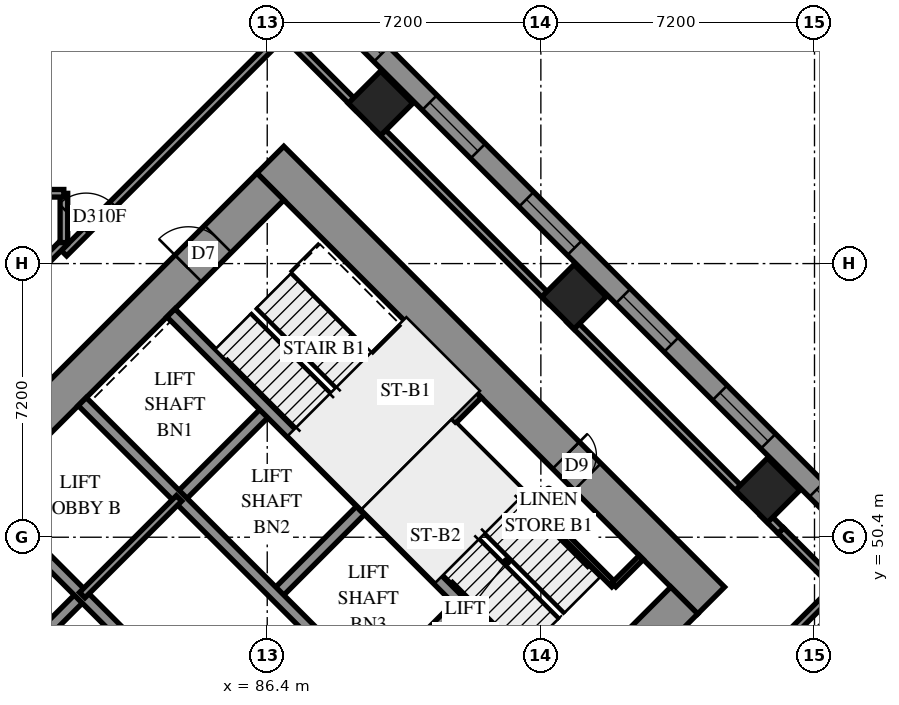
"""IFC4 building model, lengths in metres.
Left out: names, types, materials, properties, quantities, classifications, styles, units other than length and angle.
Written with IfcOpenShell. Run it as: python <this file> out.ifc"""

import sys

from ifc_helpers import new_model, si_unit, direction, frame, frame_2d, origin, origin_2d, place, context, subcontext, project, spatial, polyline, rectangle, outline, extrude, element, fill, save


model = new_model("IFC4")
c1 = context("Model", 3, precision=1e-05, world=origin(), true_north=direction((0.0, 1.0)))
c2 = subcontext(c1, "Body", "Model", "MODEL_VIEW")
j1 = project(units=[si_unit("LENGTHUNIT", "METRE"), si_unit("PLANEANGLEUNIT", "RADIAN")], contexts=[c1])
p1 = place(None, origin())
s1 = spatial("IfcSite", under=j1, at=p1, CompositionType="ELEMENT")
p2 = place(p1, origin())
s2 = spatial("IfcBuilding", under=s1, at=p2, CompositionType="ELEMENT")
p3 = place(p2, frame((0.0, 0.0, 10.2)))
s3 = spatial("IfcBuildingStorey", under=s2, at=p3, CompositionType="ELEMENT", Elevation=10.2)
for number, where, z_axis, x_axis in (
    (1, (89.382, 61.818, 0.0), (0.0, 0.0, 1.0), (0.707, -0.707, 0.0)),
    (2, (94.474, 56.727, 0.0), (0.0, 0.0, 1.0), (0.707, -0.707, 0.0)),
    (3, (99.565, 51.635, 0.0), (0.0, 0.0, 1.0), (0.707, -0.707, 0.0)),
):
    element("IfcColumn", number, at=place(p3, frame(where, z_axis=z_axis, x_axis=x_axis)), inside=s3, PredefinedType="COLUMN", context=c2, shape_type="SweptSolid", body=[
        extrude(rectangle(XDim=1.2, YDim=1.2, at=origin_2d()), origin(), (0.0, 0.0, 1.0), 3.8),
    ])
p4 = place(p3, frame((75.594, 49.443, -0.4), z_axis=(0.0, 0.0, 1.0), x_axis=(0.7071037324, -0.70710983, 0.0)))
e4 = element("IfcWall", 4, at=p4, inside=s3, PredefinedType="SHEAR", context=c2, shape_type="SweptSolid", body=[
    extrude(rectangle(XDim=16.4, YDim=1.0, at=frame_2d((8.2, 0.0))), origin(), (0.0, 0.0, 1.0), 3.5),
])
p5 = place(p3, frame((86.483, 60.333, -0.4), z_axis=(0.0, 0.0, 1.0), x_axis=(0.70710983, -0.7071037324, 0.0)))
e5 = element("IfcWall", 5, at=p5, inside=s3, PredefinedType="SHEAR", context=c2, shape_type="SweptSolid", body=[
    extrude(rectangle(XDim=16.4, YDim=1.0, at=frame_2d((8.2, 0.0))), origin(), (0.0, 0.0, 1.0), 3.5),
])
p6 = place(p5, frame((11.0, 0.0, 0.4)))
e6 = element("IfcOpeningElement", 6, at=p6, cuts=e5, PredefinedType="OPENING", context=c2, shape_type="SweptSolid", body=[
    extrude(rectangle(XDim=0.8, YDim=2.1, at=frame_2d((0.4, 1.05))), frame((0.0, 0.51, 0.0), z_axis=(0.0, -1.0, 0.0), x_axis=(1.0, 0.0, 0.0)), (0.0, 0.0, 1.0), 1.02),
])
p7 = place(p3, frame((76.301, 49.443, -0.4), z_axis=(0.0, 0.0, 1.0), x_axis=(0.7071067812, 0.7071067812, 0.0)))
e7 = element("IfcWall", 7, at=p7, inside=s3, PredefinedType="SHEAR", context=c2, shape_type="SweptSolid", body=[
    extrude(rectangle(XDim=14.4, YDim=1.0, at=frame_2d((7.2, 0.0))), origin(), (0.0, 0.0, 1.0), 3.5),
])
p8 = place(p7, frame((4.55, 0.0, 0.4)))
e8 = element("IfcOpeningElement", 8, at=p8, cuts=e7, PredefinedType="OPENING", context=c2, shape_type="SweptSolid", body=[
    extrude(rectangle(XDim=1.1, YDim=2.1, at=frame_2d((0.55, 1.05))), frame((0.0, 0.51, 0.0), z_axis=(0.0, -1.0, 0.0), x_axis=(1.0, 0.0, 0.0)), (0.0, 0.0, 1.0), 1.02),
])
p9 = place(p7, frame((11.35, 0.0, 0.4)))
e9 = element("IfcOpeningElement", 9, at=p9, cuts=e7, PredefinedType="OPENING", context=c2, shape_type="SweptSolid", body=[
    extrude(rectangle(XDim=1.1, YDim=2.1, at=frame_2d((0.55, 1.05))), frame((0.0, 0.51, 0.0), z_axis=(0.0, -1.0, 0.0), x_axis=(1.0, 0.0, 0.0)), (0.0, 0.0, 1.0), 1.02),
])
p10 = place(p3, frame((87.19, 38.554, -0.4), z_axis=(0.0, 0.0, 1.0), x_axis=(0.707103309, 0.7071102534, 0.0)))
e10 = element("IfcWall", 10, at=p10, inside=s3, PredefinedType="SHEAR", context=c2, shape_type="SweptSolid", body=[
    extrude(rectangle(XDim=14.4, YDim=1.0, at=frame_2d((7.2, 0.0))), origin(), (0.0, 0.0, 1.0), 3.5),
])
p11 = place(p10, frame((4.55, 0.0, 0.4)))
e11 = element("IfcOpeningElement", 11, at=p11, cuts=e10, PredefinedType="OPENING", context=c2, shape_type="SweptSolid", body=[
    extrude(rectangle(XDim=1.1, YDim=2.1, at=frame_2d((0.55, 1.05))), frame((0.0, 0.51, 0.0), z_axis=(0.0, -1.0, 0.0), x_axis=(1.0, 0.0, 0.0)), (0.0, 0.0, 1.0), 1.02),
])
p12 = place(p10, frame((11.35, 0.0, 0.4)))
e12 = element("IfcOpeningElement", 12, at=p12, cuts=e10, PredefinedType="OPENING", context=c2, shape_type="SweptSolid", body=[
    extrude(rectangle(XDim=1.1, YDim=2.1, at=frame_2d((0.55, 1.05))), frame((0.0, 0.51, 0.0), z_axis=(0.0, -1.0, 0.0), x_axis=(1.0, 0.0, 0.0)), (0.0, 0.0, 1.0), 1.02),
])
for number, where, z_axis, x_axis in (
    (13, (79.2, 46.544, 0.0), (0.0, 0.0, 1.0), (0.707, 0.707, 0.0)),
    (14, (84.079, 51.423, 0.0), (0.0, 0.0, 1.0), (0.707, 0.707, 0.0)),
):
    element("IfcWall", number, at=place(p3, frame(where, z_axis=z_axis, x_axis=x_axis)), inside=s3, PredefinedType="SOLIDWALL", context=c2, shape_type="SweptSolid", body=[
        extrude(rectangle(XDim=3.3, YDim=0.3, at=frame_2d((1.65, 0.0))), origin(), (0.0, 0.0, 1.0), 3.8),
    ])
for number, where, z_axis, x_axis in (
    (15, (86.625, 48.878, 0.0), (0.0, 0.0, 1.0), (0.707, 0.707, 0.0)),
    (16, (89.17, 46.332, 0.0), (0.0, 0.0, 1.0), (0.707, 0.707, 0.0)),
):
    element("IfcWall", number, at=place(p3, frame(where, z_axis=z_axis, x_axis=x_axis)), inside=s3, PredefinedType="SOLIDWALL", context=c2, shape_type="SweptSolid", body=[
        extrude(rectangle(XDim=3.3, YDim=0.3, at=frame_2d((1.65, 0.0))), origin(), (0.0, 0.0, 1.0), 3.8),
    ])
p13 = place(p3, frame((78.988, 51.423, 0.0), z_axis=(0.0, 0.0, 1.0), x_axis=(0.7071067812, -0.7071067812, 0.0)))
e17 = element("IfcWall", 17, at=p13, inside=s3, PredefinedType="SOLIDWALL", context=c2, shape_type="SweptSolid", body=[
    extrude(rectangle(XDim=14.4, YDim=0.3, at=frame_2d((7.2, 0.0))), origin(), (0.0, 0.0, 1.0), 3.8),
])
p14 = place(p13, frame((1.25, 0.0, 0.0)))
e18 = element("IfcOpeningElement", 18, at=p14, cuts=e17, PredefinedType="OPENING", context=c2, shape_type="SweptSolid", body=[
    extrude(rectangle(XDim=1.1, YDim=2.1, at=frame_2d((0.55, 1.05))), frame((0.0, 0.16, 0.0), z_axis=(0.0, -1.0, 0.0), x_axis=(1.0, 0.0, 0.0)), (0.0, 0.0, 1.0), 0.32),
])
p15 = place(p13, frame((4.85, 0.0, 0.0)))
e19 = element("IfcOpeningElement", 19, at=p15, cuts=e17, PredefinedType="OPENING", context=c2, shape_type="SweptSolid", body=[
    extrude(rectangle(XDim=1.1, YDim=2.1, at=frame_2d((0.55, 1.05))), frame((0.0, 0.16, 0.0), z_axis=(0.0, -1.0, 0.0), x_axis=(1.0, 0.0, 0.0)), (0.0, 0.0, 1.0), 0.32),
])
p16 = place(p13, frame((8.45, 0.0, 0.0)))
e20 = element("IfcOpeningElement", 20, at=p16, cuts=e17, PredefinedType="OPENING", context=c2, shape_type="SweptSolid", body=[
    extrude(rectangle(XDim=1.1, YDim=2.1, at=frame_2d((0.55, 1.05))), frame((0.0, 0.16, 0.0), z_axis=(0.0, -1.0, 0.0), x_axis=(1.0, 0.0, 0.0)), (0.0, 0.0, 1.0), 0.32),
])
p17 = place(p13, frame((12.05, 0.0, 0.0)))
e21 = element("IfcOpeningElement", 21, at=p17, cuts=e17, PredefinedType="OPENING", context=c2, shape_type="SweptSolid", body=[
    extrude(rectangle(XDim=1.1, YDim=2.1, at=frame_2d((0.55, 1.05))), frame((0.0, 0.16, 0.0), z_axis=(0.0, -1.0, 0.0), x_axis=(1.0, 0.0, 0.0)), (0.0, 0.0, 1.0), 0.32),
])
p18 = place(p3, frame((81.534, 53.969, 0.0), z_axis=(0.0, 0.0, 1.0), x_axis=(0.707103309, -0.7071102534, 0.0)))
e22 = element("IfcWall", 22, at=p18, inside=s3, PredefinedType="SOLIDWALL", context=c2, shape_type="SweptSolid", body=[
    extrude(rectangle(XDim=14.4, YDim=0.3, at=frame_2d((7.2, 0.0))), origin(), (0.0, 0.0, 1.0), 3.8),
])
p19 = place(p18, frame((12.05, 0.0, 0.0)))
e23 = element("IfcOpeningElement", 23, at=p19, cuts=e22, PredefinedType="OPENING", context=c2, shape_type="SweptSolid", body=[
    extrude(rectangle(XDim=1.1, YDim=2.1, at=frame_2d((0.55, 1.05))), frame((0.0, 0.16, 0.0), z_axis=(0.0, -1.0, 0.0), x_axis=(1.0, 0.0, 0.0)), (0.0, 0.0, 1.0), 0.32),
])
for number, where, z_axis, x_axis in (
    (24, (83.867, 56.302, 0.0), (0.0, 0.0, 1.0), (0.707, -0.707, 0.0)),
    (25, (88.958, 51.211, 0.0), (0.0, 0.0, 1.0), (0.707, -0.707, 0.0)),
):
    element("IfcWall", number, at=place(p3, frame(where, z_axis=z_axis, x_axis=x_axis)), inside=s3, PredefinedType="SOLIDWALL", context=c2, shape_type="SweptSolid", body=[
        extrude(rectangle(XDim=7.2, YDim=0.3, at=frame_2d((3.6, 0.0))), origin(), (0.0, 0.0, 1.0), 3.8),
    ])
p20 = place(p3, frame((88.958, 51.211, 0.0), z_axis=(0.0, 0.0, 1.0), x_axis=(0.7071067812, 0.7071067812, 0.0)))
e26 = element("IfcWall", 26, at=p20, inside=s3, PredefinedType="SOLIDWALL", context=c2, shape_type="SweptSolid", body=[
    extrude(rectangle(XDim=4.2, YDim=0.3, at=frame_2d((2.1, 0.0))), origin(), (0.0, 0.0, 1.0), 3.8),
])
p21 = place(p3, frame((117.843, 34.665, 0.0), z_axis=(0.0, 0.0, 1.0), x_axis=(-0.7071067812, 0.7071067812, 0.0)))
e27 = element("IfcWall", 27, at=p21, inside=s3, PredefinedType="SOLIDWALL", context=c2, shape_type="SweptSolid", body=[
    extrude(outline(polyline([(-0.275, -0.275), (54.222, -0.275), (53.994, 0.275), (0.275, 0.275), (-0.275, -0.275)])), origin(), (0.0, 0.0, 1.0), 3.8),
])
p22 = place(p21, frame((0.8, 0.0, 0.7)))
e28 = element("IfcOpeningElement", 28, at=p22, cuts=e27, PredefinedType="OPENING", context=c2, shape_type="SweptSolid", body=[
    extrude(rectangle(XDim=1.8, YDim=2.6, at=frame_2d((0.9, 1.3))), frame((0.0, 0.285, 0.0), z_axis=(0.0, -1.0, 0.0), x_axis=(1.0, 0.0, 0.0)), (0.0, 0.0, 1.0), 0.57),
])
p23 = place(p21, frame((4.225, 0.0, 0.7)))
e29 = element("IfcOpeningElement", 29, at=p23, cuts=e27, PredefinedType="OPENING", context=c2, shape_type="SweptSolid", body=[
    extrude(rectangle(XDim=1.8, YDim=2.6, at=frame_2d((0.9, 1.3))), frame((0.0, 0.285, 0.0), z_axis=(0.0, -1.0, 0.0), x_axis=(1.0, 0.0, 0.0)), (0.0, 0.0, 1.0), 0.57),
])
p24 = place(p21, frame((7.825, 0.0, 0.7)))
e30 = element("IfcOpeningElement", 30, at=p24, cuts=e27, PredefinedType="OPENING", context=c2, shape_type="SweptSolid", body=[
    extrude(rectangle(XDim=1.8, YDim=2.6, at=frame_2d((0.9, 1.3))), frame((0.0, 0.285, 0.0), z_axis=(0.0, -1.0, 0.0), x_axis=(1.0, 0.0, 0.0)), (0.0, 0.0, 1.0), 0.57),
])
p25 = place(p21, frame((11.425, 0.0, 0.7)))
e31 = element("IfcOpeningElement", 31, at=p25, cuts=e27, PredefinedType="OPENING", context=c2, shape_type="SweptSolid", body=[
    extrude(rectangle(XDim=1.8, YDim=2.6, at=frame_2d((0.9, 1.3))), frame((0.0, 0.285, 0.0), z_axis=(0.0, -1.0, 0.0), x_axis=(1.0, 0.0, 0.0)), (0.0, 0.0, 1.0), 0.57),
])
p26 = place(p21, frame((15.025, 0.0, 0.7)))
e32 = element("IfcOpeningElement", 32, at=p26, cuts=e27, PredefinedType="OPENING", context=c2, shape_type="SweptSolid", body=[
    extrude(rectangle(XDim=1.8, YDim=2.6, at=frame_2d((0.9, 1.3))), frame((0.0, 0.285, 0.0), z_axis=(0.0, -1.0, 0.0), x_axis=(1.0, 0.0, 0.0)), (0.0, 0.0, 1.0), 0.57),
])
p27 = place(p21, frame((18.625, 0.0, 0.7)))
e33 = element("IfcOpeningElement", 33, at=p27, cuts=e27, PredefinedType="OPENING", context=c2, shape_type="SweptSolid", body=[
    extrude(rectangle(XDim=1.8, YDim=2.6, at=frame_2d((0.9, 1.3))), frame((0.0, 0.285, 0.0), z_axis=(0.0, -1.0, 0.0), x_axis=(1.0, 0.0, 0.0)), (0.0, 0.0, 1.0), 0.57),
])
p28 = place(p21, frame((22.225, 0.0, 0.7)))
e34 = element("IfcOpeningElement", 34, at=p28, cuts=e27, PredefinedType="OPENING", context=c2, shape_type="SweptSolid", body=[
    extrude(rectangle(XDim=1.8, YDim=2.6, at=frame_2d((0.9, 1.3))), frame((0.0, 0.285, 0.0), z_axis=(0.0, -1.0, 0.0), x_axis=(1.0, 0.0, 0.0)), (0.0, 0.0, 1.0), 0.57),
])
p29 = place(p21, frame((25.825, 0.0, 0.7)))
e35 = element("IfcOpeningElement", 35, at=p29, cuts=e27, PredefinedType="OPENING", context=c2, shape_type="SweptSolid", body=[
    extrude(rectangle(XDim=1.8, YDim=2.6, at=frame_2d((0.9, 1.3))), frame((0.0, 0.285, 0.0), z_axis=(0.0, -1.0, 0.0), x_axis=(1.0, 0.0, 0.0)), (0.0, 0.0, 1.0), 0.57),
])
p30 = place(p21, frame((29.425, 0.0, 0.7)))
e36 = element("IfcOpeningElement", 36, at=p30, cuts=e27, PredefinedType="OPENING", context=c2, shape_type="SweptSolid", body=[
    extrude(rectangle(XDim=1.8, YDim=2.6, at=frame_2d((0.9, 1.3))), frame((0.0, 0.285, 0.0), z_axis=(0.0, -1.0, 0.0), x_axis=(1.0, 0.0, 0.0)), (0.0, 0.0, 1.0), 0.57),
])
p31 = place(p21, frame((33.025, 0.0, 0.7)))
e37 = element("IfcOpeningElement", 37, at=p31, cuts=e27, PredefinedType="OPENING", context=c2, shape_type="SweptSolid", body=[
    extrude(rectangle(XDim=1.8, YDim=2.6, at=frame_2d((0.9, 1.3))), frame((0.0, 0.285, 0.0), z_axis=(0.0, -1.0, 0.0), x_axis=(1.0, 0.0, 0.0)), (0.0, 0.0, 1.0), 0.57),
])
p32 = place(p21, frame((36.625, 0.0, 0.7)))
e38 = element("IfcOpeningElement", 38, at=p32, cuts=e27, PredefinedType="OPENING", context=c2, shape_type="SweptSolid", body=[
    extrude(rectangle(XDim=1.8, YDim=2.6, at=frame_2d((0.9, 1.3))), frame((0.0, 0.285, 0.0), z_axis=(0.0, -1.0, 0.0), x_axis=(1.0, 0.0, 0.0)), (0.0, 0.0, 1.0), 0.57),
])
p33 = place(p21, frame((40.225, 0.0, 0.7)))
e39 = element("IfcOpeningElement", 39, at=p33, cuts=e27, PredefinedType="OPENING", context=c2, shape_type="SweptSolid", body=[
    extrude(rectangle(XDim=1.8, YDim=2.6, at=frame_2d((0.9, 1.3))), frame((0.0, 0.285, 0.0), z_axis=(0.0, -1.0, 0.0), x_axis=(1.0, 0.0, 0.0)), (0.0, 0.0, 1.0), 0.57),
])
p34 = place(p21, frame((43.825, 0.0, 0.7)))
e40 = element("IfcOpeningElement", 40, at=p34, cuts=e27, PredefinedType="OPENING", context=c2, shape_type="SweptSolid", body=[
    extrude(rectangle(XDim=1.8, YDim=2.6, at=frame_2d((0.9, 1.3))), frame((0.0, 0.285, 0.0), z_axis=(0.0, -1.0, 0.0), x_axis=(1.0, 0.0, 0.0)), (0.0, 0.0, 1.0), 0.57),
])
p35 = place(p21, frame((47.425, 0.0, 0.7)))
e41 = element("IfcOpeningElement", 41, at=p35, cuts=e27, PredefinedType="OPENING", context=c2, shape_type="SweptSolid", body=[
    extrude(rectangle(XDim=1.8, YDim=2.6, at=frame_2d((0.9, 1.3))), frame((0.0, 0.285, 0.0), z_axis=(0.0, -1.0, 0.0), x_axis=(1.0, 0.0, 0.0)), (0.0, 0.0, 1.0), 0.57),
])
p36 = place(p21, frame((50.96, 0.0, 0.7)))
e42 = element("IfcOpeningElement", 42, at=p36, cuts=e27, PredefinedType="OPENING", context=c2, shape_type="SweptSolid", body=[
    extrude(rectangle(XDim=1.8, YDim=2.6, at=frame_2d((0.9, 1.3))), frame((0.0, 0.285, 0.0), z_axis=(0.0, -1.0, 0.0), x_axis=(1.0, 0.0, 0.0)), (0.0, 0.0, 1.0), 0.57),
])
p37 = place(p3, frame((91.313, 53.354, 0.0), z_axis=(0.0, 0.0, 1.0), x_axis=(0.7071067812, -0.7071067812, 0.0)))
e43 = element("IfcWall", 43, at=p37, inside=s3, PredefinedType="PARTITIONING", context=c2, shape_type="SweptSolid", body=[
    extrude(rectangle(XDim=5.95, YDim=0.15, at=frame_2d((2.975, 0.0))), origin(), (0.0, 0.0, 1.0), 3.8),
])
p38 = place(p3, frame((95.52, 49.146, 0.0), z_axis=(0.0, 0.0, 1.0), x_axis=(0.7071067812, 0.7071067812, 0.0)))
e44 = element("IfcWall", 44, at=p38, inside=s3, PredefinedType="PARTITIONING", context=c2, shape_type="SweptSolid", body=[
    extrude(rectangle(XDim=1.02, YDim=0.15, at=frame_2d((0.51, 0.0))), origin(), (0.0, 0.0, 1.0), 3.8),
])
p39 = place(p3, frame((81.534, 48.878, 0.0), z_axis=(0.0, 0.0, 1.0), x_axis=(0.707092892, 0.7071206701, 0.0)))
e45 = element("IfcWall", 45, at=p39, inside=s3, PredefinedType="PARTITIONING", context=c2, shape_type="SweptSolid", body=[
    extrude(rectangle(XDim=3.6, YDim=0.2, at=frame_2d((1.8, 0.0))), origin(), (0.0, 0.0, 1.0), 3.8),
])
p40 = place(p3, frame((95.215, 42.197, 0.0), z_axis=(0.0, 0.0, 1.0), x_axis=(0.707111589, 0.7071019733, 0.0)))
e46 = element("IfcWall", 46, at=p40, inside=s3, PredefinedType="PARTITIONING", context=c2, shape_type="SweptSolid", body=[
    extrude(rectangle(XDim=10.4, YDim=0.2, at=frame_2d((5.2, 0.0))), origin(), (0.0, 0.0, 1.0), 3.8),
])
p41 = place(p3, frame((94.863, 42.551, 0.0), z_axis=(0.0, 0.0, 1.0), x_axis=(0.7071067812, 0.7071067812, 0.0)))
e47 = element("IfcWall", 47, at=p41, inside=s3, PredefinedType="PARTITIONING", context=c2, shape_type="SweptSolid", body=[
    extrude(rectangle(XDim=9.249, YDim=0.2, at=frame_2d((4.625, 0.0))), origin(), (0.0, 0.0, 1.0), 3.8),
])
p42 = place(p3, frame((81.052, 57.873, 0.0), z_axis=(0.0, 0.0, 1.0), x_axis=(0.7071067812, 0.7071067812, 0.0)))
e48 = element("IfcWall", 48, at=p42, inside=s3, PredefinedType="PARTITIONING", context=c2, shape_type="SweptSolid", body=[
    extrude(rectangle(XDim=8.18, YDim=0.2, at=frame_2d((4.09, 0.0))), origin(), (0.0, 0.0, 1.0), 3.8),
])
p43 = place(p42, frame((0.823, 0.0, 0.0)))
e49 = element("IfcOpeningElement", 49, at=p43, cuts=e48, PredefinedType="OPENING", context=c2, shape_type="SweptSolid", body=[
    extrude(rectangle(XDim=1.0, YDim=2.1, at=frame_2d((0.5, 1.05))), frame((0.0, 0.11, 0.0), z_axis=(0.0, -1.0, 0.0), x_axis=(1.0, 0.0, 0.0)), (0.0, 0.0, 1.0), 0.22),
])
p44 = place(p3, frame((89.271, 61.215, 0.0), z_axis=(0.0, 0.0, 1.0), x_axis=(0.7071067812, -0.7071067812, 0.0)))
e50 = element("IfcWall", 50, at=p44, inside=s3, PredefinedType="PARTITIONING", context=c2, shape_type="SweptSolid", body=[
    extrude(rectangle(XDim=6.505, YDim=0.2, at=frame_2d((3.253, 0.0))), origin(), (0.0, 0.0, 1.0), 3.8),
])
p45 = place(p3, frame((94.363, 56.123, 0.0), z_axis=(0.0, 0.0, 1.0), x_axis=(0.7071067812, -0.7071067812, 0.0)))
e51 = element("IfcWall", 51, at=p45, inside=s3, PredefinedType="PARTITIONING", context=c2, shape_type="SweptSolid", body=[
    extrude(rectangle(XDim=6.503, YDim=0.2, at=frame_2d((3.251, 0.0))), origin(), (0.0, 0.0, 1.0), 3.8),
])
p46 = place(p3, frame((86.841, 63.659, 0.0), z_axis=(0.0, 0.0, 1.0), x_axis=(0.7067795096, -0.7074339014, 0.0)))
e52 = element("IfcWall", 52, at=p46, inside=s3, PredefinedType="PARTITIONING", context=c2, shape_type="SweptSolid", body=[
    extrude(rectangle(XDim=2.751, YDim=0.2, at=frame_2d((1.375, 0.0))), origin(), (0.0, 0.0, 1.0), 3.8),
])
p47 = place(p3, frame((99.918, 50.574, 0.0), z_axis=(0.0, 0.0, 1.0), x_axis=(0.7075827869, -0.7066304548, 0.0)))
e53 = element("IfcWall", 53, at=p47, inside=s3, PredefinedType="PARTITIONING", context=c2, shape_type="SweptSolid", body=[
    extrude(rectangle(XDim=2.1, YDim=0.2, at=frame_2d((1.05, 0.0))), origin(), (0.0, 0.0, 1.0), 3.8),
])
p48 = place(p3, frame((79.801, 56.905, 0.0), z_axis=(0.0, 0.0, 1.0), x_axis=(0.7071067812, 0.7071067812, 0.0)))
e54 = element("IfcWall", 54, at=p48, inside=s3, PredefinedType="PARTITIONING", context=c2, shape_type="SweptSolid", body=[
    extrude(rectangle(XDim=1.765, YDim=0.2, at=frame_2d((0.882, 0.0))), origin(), (0.0, 0.0, 1.0), 3.8),
])
p49 = place(p3, frame((81.05, 58.152, 0.0), z_axis=(0.0, 0.0, 1.0), x_axis=(0.0, 1.0, 0.0)))
e55 = element("IfcWall", 55, at=p49, inside=s3, PredefinedType="PARTITIONING", context=c2, shape_type="SweptSolid", body=[
    extrude(rectangle(XDim=1.296, YDim=0.2, at=frame_2d((0.648, 0.0))), origin(), (0.0, 0.0, 1.0), 3.8),
])
p50 = place(p3, frame((79.8, 59.45, 0.0), z_axis=(0.0, 0.0, 1.0), x_axis=(1.0, 0.0, 0.0)))
e56 = element("IfcWall", 56, at=p50, inside=s3, PredefinedType="PARTITIONING", context=c2, shape_type="SweptSolid", body=[
    extrude(rectangle(XDim=1.248, YDim=0.2, at=frame_2d((0.624, 0.0))), origin(), (0.0, 0.0, 1.0), 3.8),
])
p51 = place(p3, frame((99.453, 51.033, 0.0), z_axis=(0.0, 0.0, 1.0), x_axis=(0.7071067812, -0.7071067812, 0.0)))
e57 = element("IfcWall", 57, at=p51, inside=s3, PredefinedType="PARTITIONING", context=c2, shape_type="SweptSolid", body=[
    extrude(rectangle(XDim=0.653, YDim=0.2, at=frame_2d((0.327, 0.0))), origin(), (0.0, 0.0, 1.0), 3.8),
])
p52 = place(p28, origin())
e58 = element("IfcWindow", 58, at=p52, inside=s3, PartitioningType="SINGLE_PANEL", PredefinedType="WINDOW", context=c2, shape_type="SweptSolid", body=[
    extrude(rectangle(XDim=1.8, YDim=2.6, at=frame_2d((0.9, 1.3))), frame((0.0, 0.155, 0.0), z_axis=(0.0, -1.0, 0.0), x_axis=(1.0, 0.0, 0.0)), (0.0, 0.0, 1.0), 0.06),
])
fill(e34, e58)
p53 = place(p29, origin())
e59 = element("IfcWindow", 59, at=p53, inside=s3, PartitioningType="SINGLE_PANEL", PredefinedType="WINDOW", context=c2, shape_type="SweptSolid", body=[
    extrude(rectangle(XDim=1.8, YDim=2.6, at=frame_2d((0.9, 1.3))), frame((0.0, 0.155, 0.0), z_axis=(0.0, -1.0, 0.0), x_axis=(1.0, 0.0, 0.0)), (0.0, 0.0, 1.0), 0.06),
])
fill(e35, e59)
p54 = place(p30, origin())
e60 = element("IfcWindow", 60, at=p54, inside=s3, PartitioningType="SINGLE_PANEL", PredefinedType="WINDOW", context=c2, shape_type="SweptSolid", body=[
    extrude(rectangle(XDim=1.8, YDim=2.6, at=frame_2d((0.9, 1.3))), frame((0.0, 0.155, 0.0), z_axis=(0.0, -1.0, 0.0), x_axis=(1.0, 0.0, 0.0)), (0.0, 0.0, 1.0), 0.06),
])
fill(e36, e60)
p55 = place(p31, origin())
e61 = element("IfcWindow", 61, at=p55, inside=s3, PartitioningType="SINGLE_PANEL", PredefinedType="WINDOW", context=c2, shape_type="SweptSolid", body=[
    extrude(rectangle(XDim=1.8, YDim=2.6, at=frame_2d((0.9, 1.3))), frame((0.0, 0.155, 0.0), z_axis=(0.0, -1.0, 0.0), x_axis=(1.0, 0.0, 0.0)), (0.0, 0.0, 1.0), 0.06),
])
fill(e37, e61)
p56 = place(p32, origin())
e62 = element("IfcWindow", 62, at=p56, inside=s3, PartitioningType="SINGLE_PANEL", PredefinedType="WINDOW", context=c2, shape_type="SweptSolid", body=[
    extrude(rectangle(XDim=1.8, YDim=2.6, at=frame_2d((0.9, 1.3))), frame((0.0, 0.155, 0.0), z_axis=(0.0, -1.0, 0.0), x_axis=(1.0, 0.0, 0.0)), (0.0, 0.0, 1.0), 0.06),
])
fill(e38, e62)
p57 = place(p33, origin())
e63 = element("IfcWindow", 63, at=p57, inside=s3, PartitioningType="SINGLE_PANEL", PredefinedType="WINDOW", context=c2, shape_type="SweptSolid", body=[
    extrude(rectangle(XDim=1.8, YDim=2.6, at=frame_2d((0.9, 1.3))), frame((0.0, 0.155, 0.0), z_axis=(0.0, -1.0, 0.0), x_axis=(1.0, 0.0, 0.0)), (0.0, 0.0, 1.0), 0.06),
])
fill(e39, e63)
p58 = place(p6, origin())
e64 = element("IfcDoor", 64, at=p58, inside=s3, OperationType="SINGLE_SWING_RIGHT", PredefinedType="DOOR", context=c2, shape_type="SweptSolid", body=[
    extrude(rectangle(XDim=0.8, YDim=2.1, at=frame_2d((0.4, 1.05))), frame((0.0, -0.44, 0.0), z_axis=(0.0, -1.0, 0.0), x_axis=(1.0, 0.0, 0.0)), (0.0, 0.0, 1.0), 0.05),
])
fill(e6, e64)
p59 = place(p9, origin())
e65 = element("IfcDoor", 65, at=p59, inside=s3, OperationType="SINGLE_SWING_LEFT", PredefinedType="DOOR", context=c2, shape_type="SweptSolid", body=[
    extrude(rectangle(XDim=1.1, YDim=2.1, at=frame_2d((0.55, 1.05))), frame((0.0, 0.025, 0.0), z_axis=(0.0, -1.0, 0.0), x_axis=(1.0, 0.0, 0.0)), (0.0, 0.0, 1.0), 0.05),
])
fill(e9, e65)
p60 = place(p43, origin())
e66 = element("IfcDoor", 66, at=p60, inside=s3, OperationType="SINGLE_SWING_RIGHT", PredefinedType="DOOR", context=c2, shape_type="SweptSolid", body=[
    extrude(rectangle(XDim=1.0, YDim=2.1, at=frame_2d((0.5, 1.05))), frame((0.0, 0.025, 0.0), z_axis=(0.0, -1.0, 0.0), x_axis=(1.0, 0.0, 0.0)), (0.0, 0.0, 1.0), 0.05),
])
fill(e49, e66)
save(model, sys.argv[1])
